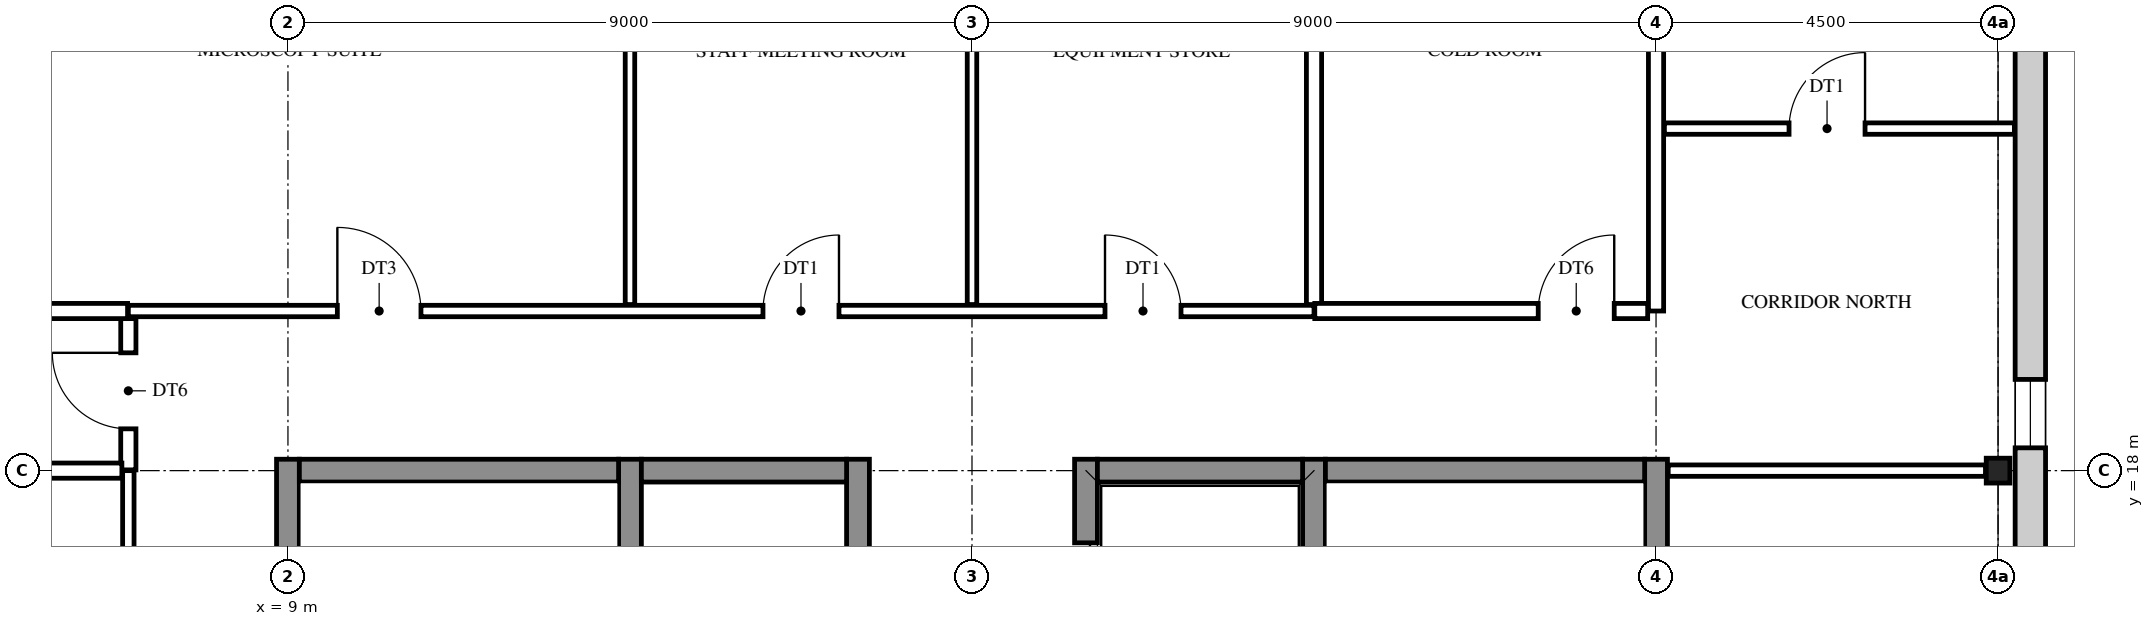
"""IFC4 building model, lengths in metres.
Left out: names, types, materials, properties, quantities, classifications, styles, units other than length and angle.
Written with IfcOpenShell. Run it as: python <this file> out.ifc"""

import sys

from ifc_helpers import new_model, si_unit, direction, frame, frame_2d, origin, origin_2d, place, context, subcontext, project, spatial, rectangle, i_section, extrude, element, fill, save


model = new_model("IFC4")
c1 = context("Model", 3, precision=1e-05, world=origin(), true_north=direction((0.0, 1.0)))
c2 = subcontext(c1, "Body", "Model", "MODEL_VIEW")
j1 = project(units=[si_unit("LENGTHUNIT", "METRE"), si_unit("PLANEANGLEUNIT", "RADIAN")], contexts=[c1])
p1 = place(None, origin())
s1 = spatial("IfcSite", under=j1, at=p1, CompositionType="ELEMENT")
p2 = place(p1, origin())
s2 = spatial("IfcBuilding", under=s1, at=p2, CompositionType="ELEMENT")
p3 = place(p2, frame((0.0, 0.0, 36.0)))
s3 = spatial("IfcBuildingStorey", under=s2, at=p3, CompositionType="ELEMENT", Elevation=36.0)
p4 = place(p3, frame((31.5, 18.0, 0.0), z_axis=(0.0, 0.0, 1.0), x_axis=(1.0, 0.0, 0.0)))
e1 = element("IfcColumn", 1, at=p4, inside=s3, PredefinedType="COLUMN", context=c2, shape_type="SweptSolid", body=[
    extrude(i_section(OverallWidth=0.311, OverallDepth=0.327, WebThickness=0.016, FlangeThickness=0.025, FilletRadius=0.017, at=origin_2d()), origin(), (0.0, 0.0, 1.0), 4.2),
])
for number, where, z_axis, x_axis in (
    (2, (9.0, 8.85, 0.0), (0.0, 0.0, 1.0), (0.0, 1.0, 0.0)),
    (3, (13.5, 8.85, 0.0), (0.0, 0.0, 1.0), (0.0, 1.0, 0.0)),
):
    element("IfcWall", number, at=place(p3, frame(where, z_axis=z_axis, x_axis=x_axis)), inside=s3, PredefinedType="SHEAR", context=c2, shape_type="SweptSolid", body=[
        extrude(rectangle(XDim=9.3, YDim=0.3, at=frame_2d((4.65, 0.0))), origin(), (0.0, 0.0, 1.0), 4.2),
    ])
p5 = place(p3, frame((16.5, 8.85, 0.0), z_axis=(0.0, 0.0, 1.0), x_axis=(0.0, 1.0, 0.0)))
e4 = element("IfcWall", 4, at=p5, inside=s3, PredefinedType="SHEAR", context=c2, shape_type="SweptSolid", body=[
    extrude(rectangle(XDim=9.3, YDim=0.3, at=frame_2d((4.65, 0.0))), origin(), (0.0, 0.0, 1.0), 4.2),
])
p6 = place(p5, frame((1.1, 0.0, 0.0)))
e5 = element("IfcOpeningElement", 5, at=p6, cuts=e4, PredefinedType="OPENING", context=c2, shape_type="SweptSolid", body=[
    extrude(rectangle(XDim=1.1, YDim=2.1, at=frame_2d((0.55, 1.05))), frame((0.0, 0.16, 0.0), z_axis=(0.0, -1.0, 0.0), x_axis=(1.0, 0.0, 0.0)), (0.0, 0.0, 1.0), 0.32),
])
p7 = place(p5, frame((4.1, 0.0, 0.0)))
e6 = element("IfcOpeningElement", 6, at=p7, cuts=e4, PredefinedType="OPENING", context=c2, shape_type="SweptSolid", body=[
    extrude(rectangle(XDim=1.1, YDim=2.1, at=frame_2d((0.55, 1.05))), frame((0.0, 0.16, 0.0), z_axis=(0.0, -1.0, 0.0), x_axis=(1.0, 0.0, 0.0)), (0.0, 0.0, 1.0), 0.32),
])
p8 = place(p3, frame((19.5, 8.85, 0.0), z_axis=(0.0, 0.0, 1.0), x_axis=(0.0, 1.0, 0.0)))
e7 = element("IfcWall", 7, at=p8, inside=s3, PredefinedType="SHEAR", context=c2, shape_type="SweptSolid", body=[
    extrude(rectangle(XDim=9.3, YDim=0.3, at=frame_2d((4.65, 0.0))), origin(), (0.0, 0.0, 1.0), 4.2),
])
p9 = place(p8, frame((3.95, 0.0, 0.0)))
e8 = element("IfcOpeningElement", 8, at=p9, cuts=e7, PredefinedType="OPENING", context=c2, shape_type="SweptSolid", body=[
    extrude(rectangle(XDim=1.4, YDim=2.1, at=frame_2d((0.7, 1.05))), frame((0.0, 0.16, 0.0), z_axis=(0.0, -1.0, 0.0), x_axis=(1.0, 0.0, 0.0)), (0.0, 0.0, 1.0), 0.32),
])
p10 = place(p8, frame((7.1, 0.0, 0.0)))
e9 = element("IfcOpeningElement", 9, at=p10, cuts=e7, PredefinedType="OPENING", context=c2, shape_type="SweptSolid", body=[
    extrude(rectangle(XDim=1.1, YDim=2.1, at=frame_2d((0.55, 1.05))), frame((0.0, 0.16, 0.0), z_axis=(0.0, -1.0, 0.0), x_axis=(1.0, 0.0, 0.0)), (0.0, 0.0, 1.0), 0.32),
])
for number, where, z_axis, x_axis in (
    (10, (22.5, 8.85, 0.0), (0.0, 0.0, 1.0), (0.0, 1.0, 0.0)),
    (11, (27.0, 8.85, 0.0), (0.0, 0.0, 1.0), (0.0, 1.0, 0.0)),
):
    element("IfcWall", number, at=place(p3, frame(where, z_axis=z_axis, x_axis=x_axis)), inside=s3, PredefinedType="SHEAR", context=c2, shape_type="SweptSolid", body=[
        extrude(rectangle(XDim=9.3, YDim=0.3, at=frame_2d((4.65, 0.0))), origin(), (0.0, 0.0, 1.0), 4.2),
    ])
p11 = place(p3, frame((9.15, 18.0, 0.0), z_axis=(0.0, 0.0, 1.0), x_axis=(1.0, 0.0, 0.0)))
e12 = element("IfcWall", 12, at=p11, inside=s3, PredefinedType="SHEAR", context=c2, shape_type="SweptSolid", body=[
    extrude(rectangle(XDim=4.2, YDim=0.3, at=frame_2d((2.1, 0.0))), origin(), (0.0, 0.0, 1.0), 4.2),
])
for number, where, z_axis, x_axis in (
    (13, (13.65, 18.0, 0.0), (0.0, 0.0, 1.0), (1.0, 0.0, 0.0)),
    (14, (19.65, 18.0, 0.0), (0.0, 0.0, 1.0), (1.0, 0.0, 0.0)),
):
    element("IfcWall", number, at=place(p3, frame(where, z_axis=z_axis, x_axis=x_axis)), inside=s3, PredefinedType="SHEAR", context=c2, shape_type="SweptSolid", body=[
        extrude(rectangle(XDim=2.7, YDim=0.3, at=frame_2d((1.35, 0.0))), origin(), (0.0, 0.0, 1.0), 4.2),
    ])
p12 = place(p3, frame((22.65, 18.0, 0.0), z_axis=(0.0, 0.0, 1.0), x_axis=(1.0, 0.0, 0.0)))
e15 = element("IfcWall", 15, at=p12, inside=s3, PredefinedType="SHEAR", context=c2, shape_type="SweptSolid", body=[
    extrude(rectangle(XDim=4.2, YDim=0.3, at=frame_2d((2.1, 0.0))), origin(), (0.0, 0.0, 1.0), 4.2),
])
p13 = place(p3, frame((31.925, 27.225, 0.0), z_axis=(0.0, 0.0, 1.0), x_axis=(0.0, -1.0, 0.0)))
e16 = element("IfcWall", 16, at=p13, inside=s3, PredefinedType="STANDARD", context=c2, shape_type="SweptSolid", body=[
    extrude(rectangle(XDim=27.45, YDim=0.4, at=frame_2d((13.725, 0.0))), origin(), (0.0, 0.0, 1.0), 4.2),
])
p14 = place(p13, frame((26.025, 0.0, 0.9)))
e17 = element("IfcOpeningElement", 17, at=p14, cuts=e16, PredefinedType="OPENING", context=c2, shape_type="SweptSolid", body=[
    extrude(rectangle(XDim=0.9, YDim=2.0, at=frame_2d((0.45, 1.0))), frame((0.0, 0.21, 0.0), z_axis=(0.0, -1.0, 0.0), x_axis=(1.0, 0.0, 0.0)), (0.0, 0.0, 1.0), 0.42),
])
p15 = place(p13, frame((18.525, 0.0, 0.9)))
e18 = element("IfcOpeningElement", 18, at=p15, cuts=e16, PredefinedType="OPENING", context=c2, shape_type="SweptSolid", body=[
    extrude(rectangle(XDim=0.9, YDim=2.0, at=frame_2d((0.45, 1.0))), frame((0.0, 0.21, 0.0), z_axis=(0.0, -1.0, 0.0), x_axis=(1.0, 0.0, 0.0)), (0.0, 0.0, 1.0), 0.42),
])
p16 = place(p13, frame((15.675, 0.0, 1.6)))
e19 = element("IfcOpeningElement", 19, at=p16, cuts=e16, PredefinedType="OPENING", context=c2, shape_type="SweptSolid", body=[
    extrude(rectangle(XDim=0.6, YDim=0.9, at=frame_2d((0.3, 0.45))), frame((0.0, 0.21, 0.0), z_axis=(0.0, -1.0, 0.0), x_axis=(1.0, 0.0, 0.0)), (0.0, 0.0, 1.0), 0.42),
])
p17 = place(p13, frame((11.175, 0.0, 1.6)))
e20 = element("IfcOpeningElement", 20, at=p17, cuts=e16, PredefinedType="OPENING", context=c2, shape_type="SweptSolid", body=[
    extrude(rectangle(XDim=0.6, YDim=0.9, at=frame_2d((0.3, 0.45))), frame((0.0, 0.21, 0.0), z_axis=(0.0, -1.0, 0.0), x_axis=(1.0, 0.0, 0.0)), (0.0, 0.0, 1.0), 0.42),
])
p18 = place(p13, frame((8.025, 0.0, 0.9)))
e21 = element("IfcOpeningElement", 21, at=p18, cuts=e16, PredefinedType="OPENING", context=c2, shape_type="SweptSolid", body=[
    extrude(rectangle(XDim=0.9, YDim=2.0, at=frame_2d((0.45, 1.0))), frame((0.0, 0.21, 0.0), z_axis=(0.0, -1.0, 0.0), x_axis=(1.0, 0.0, 0.0)), (0.0, 0.0, 1.0), 0.42),
])
p19 = place(p13, frame((0.525, 0.0, 0.9)))
e22 = element("IfcOpeningElement", 22, at=p19, cuts=e16, PredefinedType="OPENING", context=c2, shape_type="SweptSolid", body=[
    extrude(rectangle(XDim=0.9, YDim=2.0, at=frame_2d((0.45, 1.0))), frame((0.0, 0.21, 0.0), z_axis=(0.0, -1.0, 0.0), x_axis=(1.0, 0.0, 0.0)), (0.0, 0.0, 1.0), 0.42),
])
p20 = place(p3, frame((6.9, 6.985, 0.0), z_axis=(0.0, 0.0, 1.0), x_axis=(0.0, 1.0, 0.0)))
e23 = element("IfcWall", 23, at=p20, inside=s3, PredefinedType="PARTITIONING", context=c2, shape_type="SweptSolid", body=[
    extrude(rectangle(XDim=11.015, YDim=0.15, at=frame_2d((5.507, 0.0))), origin(), (0.0, 0.0, 1.0), 3.537),
])
p21 = place(p20, frame((5.965, 0.0, 0.0)))
e24 = element("IfcOpeningElement", 24, at=p21, cuts=e23, PredefinedType="OPENING", context=c2, shape_type="SweptSolid", body=[
    extrude(rectangle(XDim=1.1, YDim=2.1, at=frame_2d((0.55, 1.05))), frame((0.0, 0.085, 0.0), z_axis=(0.0, -1.0, 0.0), x_axis=(1.0, 0.0, 0.0)), (0.0, 0.0, 1.0), 0.17),
])
p22 = place(p3, frame((6.9, 18.01, 0.0), z_axis=(0.0, 0.0, 1.0), x_axis=(0.0, 1.0, 0.0)))
e25 = element("IfcWall", 25, at=p22, inside=s3, PredefinedType="PARTITIONING", context=c2, shape_type="SweptSolid", body=[
    extrude(rectangle(XDim=1.99, YDim=0.2, at=frame_2d((0.995, 0.0))), origin(), (0.0, 0.0, 1.0), 3.537),
])
p23 = place(p22, frame((0.54, 0.0, 0.0)))
e26 = element("IfcOpeningElement", 26, at=p23, cuts=e25, PredefinedType="OPENING", context=c2, shape_type="SweptSolid", body=[
    extrude(rectangle(XDim=1.0, YDim=2.1, at=frame_2d((0.5, 1.05))), frame((0.0, 0.11, 0.0), z_axis=(0.0, -1.0, 0.0), x_axis=(1.0, 0.0, 0.0)), (0.0, 0.0, 1.0), 0.22),
])
p24 = place(p3, frame((13.5, 20.185, 0.0), z_axis=(0.0, 0.0, 1.0), x_axis=(0.0, 1.0, 0.0)))
e27 = element("IfcWall", 27, at=p24, inside=s3, PredefinedType="PARTITIONING", context=c2, shape_type="SweptSolid", body=[
    extrude(rectangle(XDim=7.041, YDim=0.125, at=frame_2d((3.521, 0.0))), origin(), (0.0, 0.0, 1.0), 3.537),
])
p25 = place(p3, frame((18.0, 20.185, 0.0), z_axis=(0.0, 0.0, 1.0), x_axis=(0.0, 1.0, 0.0)))
e28 = element("IfcWall", 28, at=p25, inside=s3, PredefinedType="PARTITIONING", context=c2, shape_type="SweptSolid", body=[
    extrude(rectangle(XDim=6.641, YDim=0.125, at=frame_2d((3.321, 0.0))), origin(), (0.0, 0.0, 1.0), 3.537),
])
p26 = place(p3, frame((22.5, 20.185, 0.0), z_axis=(0.0, 0.0, 1.0), x_axis=(0.0, 1.0, 0.0)))
e29 = element("IfcWall", 29, at=p26, inside=s3, PredefinedType="PARTITIONING", context=c2, shape_type="SweptSolid", body=[
    extrude(rectangle(XDim=7.041, YDim=0.2, at=frame_2d((3.521, 0.0))), origin(), (0.0, 0.0, 1.0), 3.537),
])
p27 = place(p3, frame((27.0, 20.1, 0.0), z_axis=(0.0, 0.0, 1.0), x_axis=(0.0, 1.0, 0.0)))
e30 = element("IfcWall", 30, at=p27, inside=s3, PredefinedType="PARTITIONING", context=c2, shape_type="SweptSolid", body=[
    extrude(rectangle(XDim=6.726, YDim=0.2, at=frame_2d((3.363, 0.0))), origin(), (0.0, 0.0, 1.0), 3.537),
])
p28 = place(p3, frame((0.166, 18.0, 0.0), z_axis=(0.0, 0.0, 1.0), x_axis=(1.0, 0.0, 0.0)))
e31 = element("IfcWall", 31, at=p28, inside=s3, PredefinedType="PARTITIONING", context=c2, shape_type="SweptSolid", body=[
    extrude(rectangle(XDim=6.649, YDim=0.2, at=frame_2d((3.325, 0.0))), origin(), (0.0, 0.0, 1.0), 3.537),
])
p29 = place(p3, frame((27.16, 18.0, 0.0), z_axis=(0.0, 0.0, 1.0), x_axis=(1.0, 0.0, 0.0)))
e32 = element("IfcWall", 32, at=p29, inside=s3, PredefinedType="PARTITIONING", context=c2, shape_type="SweptSolid", body=[
    extrude(rectangle(XDim=4.175, YDim=0.15, at=frame_2d((2.087, 0.0))), origin(), (0.0, 0.0, 1.0), 3.537),
])
p30 = place(p3, frame((4.61, 20.1, 0.0), z_axis=(0.0, 0.0, 1.0), x_axis=(1.0, 0.0, 0.0)))
e33 = element("IfcWall", 33, at=p30, inside=s3, PredefinedType="PARTITIONING", context=c2, shape_type="SweptSolid", body=[
    extrude(rectangle(XDim=2.28, YDim=0.2, at=frame_2d((1.14, 0.0))), origin(), (0.0, 0.0, 1.0), 3.537),
])
p31 = place(p3, frame((6.9, 20.1, 0.0), z_axis=(0.0, 0.0, 1.0), x_axis=(1.0, 0.0, 0.0)))
e34 = element("IfcWall", 34, at=p31, inside=s3, PredefinedType="PARTITIONING", context=c2, shape_type="SweptSolid", body=[
    extrude(rectangle(XDim=15.6, YDim=0.15, at=frame_2d((7.8, 0.0))), origin(), (0.0, 0.0, 1.0), 3.537),
])
p32 = place(p31, frame((2.75, 0.0, 0.0)))
e35 = element("IfcOpeningElement", 35, at=p32, cuts=e34, PredefinedType="OPENING", context=c2, shape_type="SweptSolid", body=[
    extrude(rectangle(XDim=1.1, YDim=2.1, at=frame_2d((0.55, 1.05))), frame((0.0, 0.085, 0.0), z_axis=(0.0, -1.0, 0.0), x_axis=(1.0, 0.0, 0.0)), (0.0, 0.0, 1.0), 0.17),
])
p33 = place(p31, frame((8.35, 0.0, 0.0)))
e36 = element("IfcOpeningElement", 36, at=p33, cuts=e34, PredefinedType="OPENING", context=c2, shape_type="SweptSolid", body=[
    extrude(rectangle(XDim=1.0, YDim=2.1, at=frame_2d((0.5, 1.05))), frame((0.0, 0.085, 0.0), z_axis=(0.0, -1.0, 0.0), x_axis=(1.0, 0.0, 0.0)), (0.0, 0.0, 1.0), 0.17),
])
p34 = place(p31, frame((12.85, 0.0, 0.0)))
e37 = element("IfcOpeningElement", 37, at=p34, cuts=e34, PredefinedType="OPENING", context=c2, shape_type="SweptSolid", body=[
    extrude(rectangle(XDim=1.0, YDim=2.1, at=frame_2d((0.5, 1.05))), frame((0.0, 0.085, 0.0), z_axis=(0.0, -1.0, 0.0), x_axis=(1.0, 0.0, 0.0)), (0.0, 0.0, 1.0), 0.17),
])
p35 = place(p3, frame((22.51, 20.1, 0.0), z_axis=(0.0, 0.0, 1.0), x_axis=(1.0, 0.0, 0.0)))
e38 = element("IfcWall", 38, at=p35, inside=s3, PredefinedType="PARTITIONING", context=c2, shape_type="SweptSolid", body=[
    extrude(rectangle(XDim=4.38, YDim=0.2, at=frame_2d((2.19, 0.0))), origin(), (0.0, 0.0, 1.0), 3.537),
])
p36 = place(p35, frame((2.94, 0.0, 0.0)))
e39 = element("IfcOpeningElement", 39, at=p36, cuts=e38, PredefinedType="OPENING", context=c2, shape_type="SweptSolid", body=[
    extrude(rectangle(XDim=1.0, YDim=2.1, at=frame_2d((0.5, 1.05))), frame((0.0, 0.11, 0.0), z_axis=(0.0, -1.0, 0.0), x_axis=(1.0, 0.0, 0.0)), (0.0, 0.0, 1.0), 0.22),
])
p37 = place(p3, frame((27.11, 22.5, 0.0), z_axis=(0.0, 0.0, 1.0), x_axis=(1.0, 0.0, 0.0)))
e40 = element("IfcWall", 40, at=p37, inside=s3, PredefinedType="PARTITIONING", context=c2, shape_type="SweptSolid", body=[
    extrude(rectangle(XDim=4.605, YDim=0.15, at=frame_2d((2.302, 0.0))), origin(), (0.0, 0.0, 1.0), 3.537),
])
p38 = place(p37, frame((1.64, 0.0, 0.0)))
e41 = element("IfcOpeningElement", 41, at=p38, cuts=e40, PredefinedType="OPENING", context=c2, shape_type="SweptSolid", body=[
    extrude(rectangle(XDim=1.0, YDim=2.1, at=frame_2d((0.5, 1.05))), frame((0.0, 0.085, 0.0), z_axis=(0.0, -1.0, 0.0), x_axis=(1.0, 0.0, 0.0)), (0.0, 0.0, 1.0), 0.17),
])
p39 = place(p18, origin())
e42 = element("IfcWindow", 42, at=p39, inside=s3, PartitioningType="SINGLE_PANEL", PredefinedType="WINDOW", context=c2, shape_type="SweptSolid", body=[
    extrude(rectangle(XDim=0.9, YDim=2.0, at=frame_2d((0.45, 1.0))), frame((0.0, 0.03, 0.0), z_axis=(0.0, -1.0, 0.0), x_axis=(1.0, 0.0, 0.0)), (0.0, 0.0, 1.0), 0.06),
])
fill(e21, e42)
p40 = place(p23, origin())
e43 = element("IfcDoor", 43, at=p40, inside=s3, OperationType="SINGLE_SWING_RIGHT", PredefinedType="DOOR", context=c2, shape_type="SweptSolid", body=[
    extrude(rectangle(XDim=1.0, YDim=2.1, at=frame_2d((0.5, 1.05))), frame((0.0, 0.025, 0.0), z_axis=(0.0, -1.0, 0.0), x_axis=(1.0, 0.0, 0.0)), (0.0, 0.0, 1.0), 0.05),
])
fill(e26, e43)
p41 = place(p32, origin())
e44 = element("IfcDoor", 44, at=p41, inside=s3, OperationType="SINGLE_SWING_LEFT", PredefinedType="DOOR", context=c2, shape_type="SweptSolid", body=[
    extrude(rectangle(XDim=1.1, YDim=2.1, at=frame_2d((0.55, 1.05))), frame((0.0, 0.025, 0.0), z_axis=(0.0, -1.0, 0.0), x_axis=(1.0, 0.0, 0.0)), (0.0, 0.0, 1.0), 0.05),
])
fill(e35, e44)
p42 = place(p33, origin())
e45 = element("IfcDoor", 45, at=p42, inside=s3, OperationType="SINGLE_SWING_RIGHT", PredefinedType="DOOR", context=c2, shape_type="SweptSolid", body=[
    extrude(rectangle(XDim=1.0, YDim=2.1, at=frame_2d((0.5, 1.05))), frame((0.0, 0.025, 0.0), z_axis=(0.0, -1.0, 0.0), x_axis=(1.0, 0.0, 0.0)), (0.0, 0.0, 1.0), 0.05),
])
fill(e36, e45)
p43 = place(p34, origin())
e46 = element("IfcDoor", 46, at=p43, inside=s3, OperationType="SINGLE_SWING_LEFT", PredefinedType="DOOR", context=c2, shape_type="SweptSolid", body=[
    extrude(rectangle(XDim=1.0, YDim=2.1, at=frame_2d((0.5, 1.05))), frame((0.0, 0.025, 0.0), z_axis=(0.0, -1.0, 0.0), x_axis=(1.0, 0.0, 0.0)), (0.0, 0.0, 1.0), 0.05),
])
fill(e37, e46)
p44 = place(p36, origin())
e47 = element("IfcDoor", 47, at=p44, inside=s3, OperationType="SINGLE_SWING_RIGHT", PredefinedType="DOOR", context=c2, shape_type="SweptSolid", body=[
    extrude(rectangle(XDim=1.0, YDim=2.1, at=frame_2d((0.5, 1.05))), frame((0.0, 0.025, 0.0), z_axis=(0.0, -1.0, 0.0), x_axis=(1.0, 0.0, 0.0)), (0.0, 0.0, 1.0), 0.05),
])
fill(e39, e47)
p45 = place(p38, origin())
e48 = element("IfcDoor", 48, at=p45, inside=s3, OperationType="SINGLE_SWING_RIGHT", PredefinedType="DOOR", context=c2, shape_type="SweptSolid", body=[
    extrude(rectangle(XDim=1.0, YDim=2.1, at=frame_2d((0.5, 1.05))), frame((0.0, 0.025, 0.0), z_axis=(0.0, -1.0, 0.0), x_axis=(1.0, 0.0, 0.0)), (0.0, 0.0, 1.0), 0.05),
])
fill(e41, e48)
p46 = place(p10, origin())
e49 = element("IfcDoor", 49, at=p46, inside=s3, OperationType="DOUBLE_DOOR_SLIDING", PredefinedType="DOOR", context=c2, shape_type="SweptSolid", body=[
    extrude(rectangle(XDim=1.1, YDim=2.1, at=frame_2d((0.55, 1.05))), frame((0.0, 0.025, 0.0), z_axis=(0.0, -1.0, 0.0), x_axis=(1.0, 0.0, 0.0)), (0.0, 0.0, 1.0), 0.05),
])
fill(e9, e49)
save(model, sys.argv[1])
